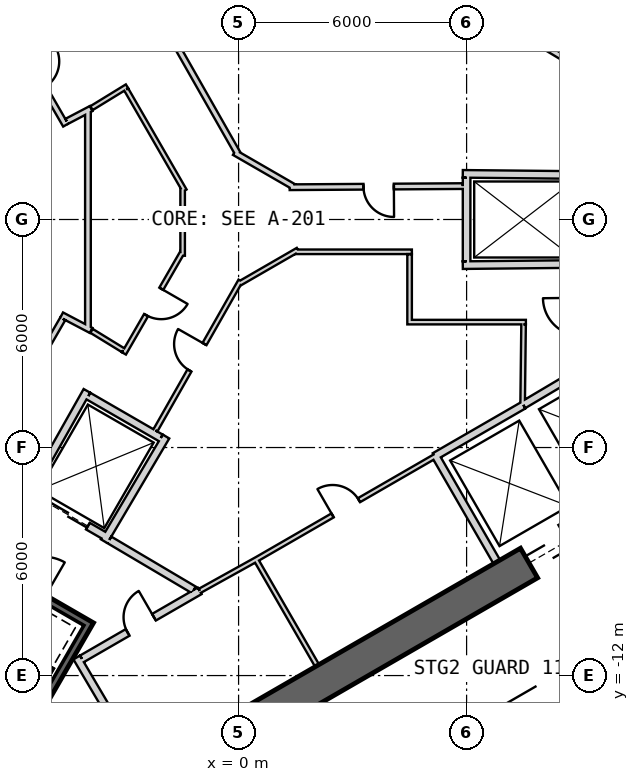
"""IFC4 building model, lengths in metres.
Left out: names, types, materials, properties, quantities, classifications, styles, units other than length and angle.
Written with IfcOpenShell. Run it as: python <this file> out.ifc"""

import sys

from ifc_helpers import new_model, si_unit, direction, frame, frame_2d, origin, place, context, subcontext, project, spatial, rectangle, extrude, element, fill, save


model = new_model("IFC4")
c1 = context("Model", 3, precision=1e-05, world=origin(), true_north=direction((0.0, 1.0)))
c2 = subcontext(c1, "Body", "Model", "MODEL_VIEW")
j1 = project(units=[si_unit("LENGTHUNIT", "METRE"), si_unit("PLANEANGLEUNIT", "RADIAN")], contexts=[c1])
p1 = place(None, origin())
s1 = spatial("IfcSite", under=j1, at=p1, CompositionType="ELEMENT")
p2 = place(p1, origin())
s2 = spatial("IfcBuilding", under=s1, at=p2, CompositionType="ELEMENT")
p3 = place(p2, frame((0.0, 0.0, -11.0)))
s3 = spatial("IfcBuildingStorey", under=s2, at=p3, CompositionType="ELEMENT", Elevation=-11.0)
p4 = place(p3, frame((19.475, 2.208, -0.4), z_axis=(0.0, 0.0, 1.0), x_axis=(-0.866028369851, 0.499994862586, 0.0)))
e1 = element("IfcWall", 1, at=p4, inside=s3, PredefinedType="SHEAR", context=c2, shape_type="SweptSolid", body=[
    extrude(rectangle(XDim=31.523, YDim=0.9, at=frame_2d((15.762, 0.0))), origin(), (0.0, 0.0, 1.0), 5.9),
])
p5 = place(p4, frame((3.612, 0.0, 0.4)))
e2 = element("IfcOpeningElement", 2, at=p5, cuts=e1, PredefinedType="OPENING", context=c2, shape_type="SweptSolid", body=[
    extrude(rectangle(XDim=1.2, YDim=2.4, at=frame_2d((0.6, 1.2))), frame((0.0, 0.46, 0.0), z_axis=(0.0, -1.0, 0.0), x_axis=(1.0, 0.0, 0.0)), (0.0, 0.0, 1.0), 0.92),
])
p6 = place(p4, frame((26.712, 0.0, 0.4)))
e3 = element("IfcOpeningElement", 3, at=p6, cuts=e1, PredefinedType="OPENING", context=c2, shape_type="SweptSolid", body=[
    extrude(rectangle(XDim=1.2, YDim=2.4, at=frame_2d((0.6, 1.2))), frame((0.0, 0.46, 0.0), z_axis=(0.0, -1.0, 0.0), x_axis=(1.0, 0.0, 0.0)), (0.0, 0.0, 1.0), 0.92),
])
p7 = place(p3, frame((-7.825, -17.97, -0.4), z_axis=(0.0, 0.0, 1.0), x_axis=(0.866028369851, 0.499994862586, 0.0)))
e4 = element("IfcWall", 4, at=p7, inside=s3, PredefinedType="SHEAR", context=c2, shape_type="SweptSolid", body=[
    extrude(rectangle(XDim=31.523, YDim=0.9, at=frame_2d((15.762, 0.0))), origin(), (0.0, 0.0, 1.0), 5.9),
])
p8 = place(p7, frame((17.862, 0.0, 0.4)))
e5 = element("IfcOpeningElement", 5, at=p8, cuts=e4, PredefinedType="OPENING", context=c2, shape_type="SweptSolid", body=[
    extrude(rectangle(XDim=1.2, YDim=2.4, at=frame_2d((0.6, 1.2))), frame((0.0, 0.46, 0.0), z_axis=(0.0, -1.0, 0.0), x_axis=(1.0, 0.0, 0.0)), (0.0, 0.0, 1.0), 0.92),
])
p9 = place(p7, frame((20.562, 0.0, 0.4)))
e6 = element("IfcOpeningElement", 6, at=p9, cuts=e4, PredefinedType="OPENING", context=c2, shape_type="SweptSolid", body=[
    extrude(rectangle(XDim=1.2, YDim=2.4, at=frame_2d((0.6, 1.2))), frame((0.0, 0.46, 0.0), z_axis=(0.0, -1.0, 0.0), x_axis=(1.0, 0.0, 0.0)), (0.0, 0.0, 1.0), 0.92),
])
p10 = place(p7, frame((26.712, 0.0, 0.4)))
e7 = element("IfcOpeningElement", 7, at=p10, cuts=e4, PredefinedType="OPENING", context=c2, shape_type="SweptSolid", body=[
    extrude(rectangle(XDim=1.2, YDim=2.4, at=frame_2d((0.6, 1.2))), frame((0.0, 0.46, 0.0), z_axis=(0.0, -1.0, 0.0), x_axis=(1.0, 0.0, 0.0)), (0.0, 0.0, 1.0), 0.92),
])
p11 = place(p7, frame((3.612, 0.0, 0.4)))
e8 = element("IfcOpeningElement", 8, at=p11, cuts=e4, PredefinedType="OPENING", context=c2, shape_type="SweptSolid", body=[
    extrude(rectangle(XDim=1.2, YDim=2.4, at=frame_2d((0.6, 1.2))), frame((0.0, 0.46, 0.0), z_axis=(0.0, -1.0, 0.0), x_axis=(1.0, 0.0, 0.0)), (0.0, 0.0, 1.0), 0.92),
])
p12 = place(p3, frame((6.795, -9.01, 0.0), z_axis=(0.0, 0.0, 1.0), x_axis=(-0.499984717929, 0.866034226713, 0.0)))
e9 = element("IfcWall", 9, at=p12, inside=s3, PredefinedType="PLUMBINGWALL", context=c2, shape_type="SweptSolid", body=[
    extrude(rectangle(XDim=3.25, YDim=0.2, at=frame_2d((1.625, 0.0))), origin(), (0.0, 0.0, 1.0), 5.1),
])
p13 = place(p3, frame((5.159, -6.236, 0.0), z_axis=(0.0, 0.0, 1.0), x_axis=(0.866036505625, 0.499980770555, 0.0)))
e10 = element("IfcWall", 10, at=p13, inside=s3, PredefinedType="PLUMBINGWALL", context=c2, shape_type="SweptSolid", body=[
    extrude(rectangle(XDim=2.7, YDim=0.2, at=frame_2d((1.35, 0.0))), origin(), (0.0, 0.0, 1.0), 5.1),
])
p14 = place(p3, frame((7.493, -4.878, 0.0), z_axis=(0.0, 0.0, 1.0), x_axis=(0.859981807212, 0.510324691999, 0.0)))
e11 = element("IfcWall", 11, at=p14, inside=s3, PredefinedType="PLUMBINGWALL", context=c2, shape_type="SweptSolid", body=[
    extrude(rectangle(XDim=1.845, YDim=0.2, at=frame_2d((0.922, 0.0))), origin(), (0.0, 0.0, 1.0), 5.1),
])
p15 = place(p3, frame((6.0, -1.1, 0.0), z_axis=(0.0, 0.0, 1.0), x_axis=(0.0, 1.0, 0.0)))
e12 = element("IfcWall", 12, at=p15, inside=s3, PredefinedType="PLUMBINGWALL", context=c2, shape_type="SweptSolid", body=[
    extrude(rectangle(XDim=2.2, YDim=0.2, at=frame_2d((1.1, 0.0))), origin(), (0.0, 0.0, 1.0), 5.1),
])
for number, where, z_axis, x_axis in (
    (13, (5.9, 1.201, 0.0), (0.0, 0.0, 1.0), (1.0, -0.01, 0.0)),
    (14, (5.9, -1.201, 0.0), (0.0, 0.0, 1.0), (1.0, 0.01, 0.0)),
):
    element("IfcWall", number, at=place(p3, frame(where, z_axis=z_axis, x_axis=x_axis)), inside=s3, PredefinedType="PLUMBINGWALL", context=c2, shape_type="SweptSolid", body=[
        extrude(rectangle(XDim=3.2, YDim=0.2, at=frame_2d((1.6, 0.0))), origin(), (0.0, 0.0, 1.0), 5.1),
    ])
p16 = place(p3, frame((-3.905, -10.563, -0.4), z_axis=(0.0, 0.0, 1.0), x_axis=(-0.500012932018, -0.866017937352, 0.0)))
e15 = element("IfcWall", 15, at=p16, inside=s3, PredefinedType="SHEAR", context=c2, shape_type="SweptSolid", body=[
    extrude(rectangle(XDim=8.1, YDim=0.2, at=frame_2d((4.05, 0.0))), origin(), (0.0, 0.0, 1.0), 5.5),
])
p17 = place(p3, frame((-4.041, -10.599, -0.4), z_axis=(0.0, 0.0, 1.0), x_axis=(-0.866047807691, 0.499961193289, 0.0)))
e16 = element("IfcWall", 16, at=p17, inside=s3, PredefinedType="SHEAR", context=c2, shape_type="SweptSolid", body=[
    extrude(rectangle(XDim=3.6, YDim=0.2, at=frame_2d((1.8, 0.0))), origin(), (0.0, 0.0, 1.0), 5.5),
])
p18 = place(p17, frame((1.25, 0.0, 0.4)))
e17 = element("IfcOpeningElement", 17, at=p18, cuts=e16, PredefinedType="OPENING", context=c2, shape_type="SweptSolid", body=[
    extrude(rectangle(XDim=1.1, YDim=2.1, at=frame_2d((0.55, 1.05))), frame((0.0, 0.11, 0.0), z_axis=(0.0, -1.0, 0.0), x_axis=(1.0, 0.0, 0.0)), (0.0, 0.0, 1.0), 0.22),
])
p19 = place(p3, frame((-3.446, -8.368, 0.0), z_axis=(0.0, 0.0, 1.0), x_axis=(-0.866024647952, 0.500001309137, 0.0)))
e18 = element("IfcWall", 18, at=p19, inside=s3, PredefinedType="PLUMBINGWALL", context=c2, shape_type="SweptSolid", body=[
    extrude(rectangle(XDim=2.4, YDim=0.2, at=frame_2d((1.2, 0.0))), origin(), (0.0, 0.0, 1.0), 5.1),
])
p20 = place(p19, frame((0.6, 0.0, 0.0)))
e19 = element("IfcOpeningElement", 19, at=p20, cuts=e18, PredefinedType="OPENING", context=c2, shape_type="SweptSolid", body=[
    extrude(rectangle(XDim=1.2, YDim=2.4, at=frame_2d((0.6, 1.2))), frame((0.0, 0.11, 0.0), z_axis=(0.0, -1.0, 0.0), x_axis=(1.0, 0.0, 0.0)), (0.0, 0.0, 1.0), 0.22),
])
p21 = place(p3, frame((-3.953, -4.646, 0.0), z_axis=(0.0, 0.0, 1.0), x_axis=(0.86605622881, -0.499946605688, 0.0)))
e20 = element("IfcWall", 20, at=p21, inside=s3, PredefinedType="PLUMBINGWALL", context=c2, shape_type="SweptSolid", body=[
    extrude(rectangle(XDim=2.2, YDim=0.2, at=frame_2d((1.1, 0.0))), origin(), (0.0, 0.0, 1.0), 5.1),
])
p22 = place(p3, frame((-1.91, -5.71, 0.0), z_axis=(0.0, 0.0, 1.0), x_axis=(-0.508616218331, -0.860993346345, 0.0)))
e21 = element("IfcWall", 21, at=p22, inside=s3, PredefinedType="PLUMBINGWALL", context=c2, shape_type="SweptSolid", body=[
    extrude(rectangle(XDim=3.2, YDim=0.2, at=frame_2d((1.6, 0.0))), origin(), (0.0, 0.0, 1.0), 5.1),
])
p23 = place(p3, frame((-3.99, -4.509, 0.0), z_axis=(0.0, 0.0, 1.0), x_axis=(-0.491358283181, -0.870957540612, 0.0)))
e22 = element("IfcWall", 22, at=p23, inside=s3, PredefinedType="PLUMBINGWALL", context=c2, shape_type="SweptSolid", body=[
    extrude(rectangle(XDim=3.2, YDim=0.2, at=frame_2d((1.6, 0.0))), origin(), (0.0, 0.0, 1.0), 5.1),
])
p24 = place(p3, frame((8.975, 4.0, 0.0), z_axis=(0.0, 0.0, 1.0), x_axis=(-0.857530436795, 0.514433231791, 0.0)))
e23 = element("IfcWall", 23, at=p24, inside=s3, PredefinedType="PLUMBINGWALL", context=c2, shape_type="SweptSolid", body=[
    extrude(rectangle(XDim=1.723, YDim=0.15, at=frame_2d((0.861, 0.0))), origin(), (0.0, 0.0, 1.0), 5.1),
])
p25 = place(p3, frame((2.067, -11.74, 0.0), z_axis=(0.0, 0.0, 1.0), x_axis=(-0.499984717929, 0.866034226713, 0.0)))
e24 = element("IfcWall", 24, at=p25, inside=s3, PredefinedType="PARTITIONING", context=c2, shape_type="SweptSolid", body=[
    extrude(rectangle(XDim=3.25, YDim=0.12, at=frame_2d((1.625, 0.0))), origin(), (0.0, 0.0, 1.0), 5.1),
])
p26 = place(p3, frame((-4.26, -11.524, 0.0), z_axis=(0.0, 0.0, 1.0), x_axis=(0.507997497166, -0.861358544901, 0.0)))
e25 = element("IfcWall", 25, at=p26, inside=s3, PredefinedType="PARTITIONING", context=c2, shape_type="SweptSolid", body=[
    extrude(rectangle(XDim=3.35, YDim=0.2, at=frame_2d((1.675, 0.0))), origin(), (0.0, 0.0, 1.0), 5.1),
])
p27 = place(p3, frame((-1.024, -9.771, 0.0), z_axis=(0.0, 0.0, 1.0), x_axis=(-0.866029903013, -0.499992207027, 0.0)))
e26 = element("IfcWall", 26, at=p27, inside=s3, PredefinedType="PARTITIONING", context=c2, shape_type="SweptSolid", body=[
    extrude(rectangle(XDim=3.578, YDim=0.2, at=frame_2d((1.789, 0.0))), origin(), (0.0, 0.0, 1.0), 5.1),
])
p28 = place(p27, frame((1.389, 0.0, 0.0)))
e27 = element("IfcOpeningElement", 27, at=p28, cuts=e26, PredefinedType="OPENING", context=c2, shape_type="SweptSolid", body=[
    extrude(rectangle(XDim=0.8, YDim=2.1, at=frame_2d((0.4, 1.05))), frame((0.0, 0.11, 0.0), z_axis=(0.0, -1.0, 0.0), x_axis=(1.0, 0.0, 0.0)), (0.0, 0.0, 1.0), 0.22),
])
p29 = place(p3, frame((-1.023, -9.772, 0.0), z_axis=(0.0, 0.0, 1.0), x_axis=(0.874290944206, 0.485402250592, 0.0)))
e28 = element("IfcWall", 28, at=p29, inside=s3, PredefinedType="PARTITIONING", context=c2, shape_type="SweptSolid", body=[
    extrude(rectangle(XDim=1.723, YDim=0.12, at=frame_2d((0.861, 0.0))), origin(), (0.0, 0.0, 1.0), 5.1),
])
p30 = place(p3, frame((0.483, -8.936, 0.0), z_axis=(0.0, 0.0, 1.0), x_axis=(0.866028230842, 0.499995103361, 0.0)))
e29 = element("IfcWall", 29, at=p30, inside=s3, PredefinedType="PARTITIONING", context=c2, shape_type="SweptSolid", body=[
    extrude(rectangle(XDim=5.4, YDim=0.12, at=frame_2d((2.7, 0.0))), origin(), (0.0, 0.0, 1.0), 5.1),
])
p31 = place(p30, frame((2.3, 0.0, 0.0)))
e30 = element("IfcOpeningElement", 30, at=p31, cuts=e29, PredefinedType="OPENING", context=c2, shape_type="SweptSolid", body=[
    extrude(rectangle(XDim=0.8, YDim=2.1, at=frame_2d((0.4, 1.05))), frame((0.0, 0.07, 0.0), z_axis=(0.0, -1.0, 0.0), x_axis=(1.0, 0.0, 0.0)), (0.0, 0.0, 1.0), 0.14),
])
p32 = place(p3, frame((-3.401, -8.43, 0.0), z_axis=(0.0, 0.0, 1.0), x_axis=(0.860630814782, -0.509229418482, 0.0)))
e31 = element("IfcWall", 31, at=p32, inside=s3, PredefinedType="PARTITIONING", context=c2, shape_type="SweptSolid", body=[
    extrude(rectangle(XDim=2.582, YDim=0.2, at=frame_2d((1.291, 0.0))), origin(), (0.0, 0.0, 1.0), 5.1),
])
p33 = place(p3, frame((1.344, 0.849, 0.0), z_axis=(0.0, 0.0, 1.0), x_axis=(0.999978627641, 0.00653790957, 0.0)))
e32 = element("IfcWall", 32, at=p33, inside=s3, PredefinedType="PLUMBINGWALL", context=c2, shape_type="SweptSolid", body=[
    extrude(rectangle(XDim=4.556, YDim=0.15, at=frame_2d((2.278, 0.0))), origin(), (0.0, 0.0, 1.0), 5.1),
])
p34 = place(p33, frame((1.942, 0.0, 0.0)))
e33 = element("IfcOpeningElement", 33, at=p34, cuts=e32, PredefinedType="OPENING", context=c2, shape_type="SweptSolid", body=[
    extrude(rectangle(XDim=0.8, YDim=2.1, at=frame_2d((0.4, 1.05))), frame((0.0, 0.085, 0.0), z_axis=(0.0, -1.0, 0.0), x_axis=(1.0, 0.0, 0.0)), (0.0, 0.0, 1.0), 0.17),
])
p35 = place(p3, frame((-0.111, 1.764, 0.0), z_axis=(0.0, 0.0, 1.0), x_axis=(0.866061671171, -0.499937177781, 0.0)))
e34 = element("IfcWall", 34, at=p35, inside=s3, PredefinedType="PLUMBINGWALL", context=c2, shape_type="SweptSolid", body=[
    extrude(rectangle(XDim=1.804, YDim=0.15, at=frame_2d((0.902, 0.0))), origin(), (0.0, 0.0, 1.0), 5.1),
])
p36 = place(p3, frame((-2.189, 5.549, 0.0), z_axis=(0.0, 0.0, 1.0), x_axis=(0.494335077001, -0.869271437266, 0.0)))
e35 = element("IfcWall", 35, at=p36, inside=s3, PredefinedType="PLUMBINGWALL", context=c2, shape_type="SweptSolid", body=[
    extrude(rectangle(XDim=4.404, YDim=0.15, at=frame_2d((2.202, 0.0))), origin(), (0.0, 0.0, 1.0), 5.1),
])
p37 = place(p3, frame((0.051, -1.611, 0.0), z_axis=(0.0, 0.0, 1.0), x_axis=(-0.49434454467, -0.869266053148, 0.0)))
e36 = element("IfcWall", 36, at=p37, inside=s3, PredefinedType="PARTITIONING", context=c2, shape_type="SweptSolid", body=[
    extrude(rectangle(XDim=4.53, YDim=0.12, at=frame_2d((2.265, 0.0))), origin(), (0.0, 0.0, 1.0), 5.1),
])
p38 = place(p37, frame((1.916, 0.0, 0.0)))
e37 = element("IfcOpeningElement", 37, at=p38, cuts=e36, PredefinedType="OPENING", context=c2, shape_type="SweptSolid", body=[
    extrude(rectangle(XDim=0.8, YDim=2.1, at=frame_2d((0.4, 1.05))), frame((0.0, 0.07, 0.0), z_axis=(0.0, -1.0, 0.0), x_axis=(1.0, 0.0, 0.0)), (0.0, 0.0, 1.0), 0.14),
])
p39 = place(p3, frame((1.562, -0.798, 0.0), z_axis=(0.0, 0.0, 1.0), x_axis=(-0.86601248742, -0.500022371132, 0.0)))
e38 = element("IfcWall", 38, at=p39, inside=s3, PredefinedType="PARTITIONING", context=c2, shape_type="SweptSolid", body=[
    extrude(rectangle(XDim=1.785, YDim=0.12, at=frame_2d((0.893, 0.0))), origin(), (0.0, 0.0, 1.0), 5.1),
])
p40 = place(p3, frame((4.56, -0.85, 0.0), z_axis=(0.0, 0.0, 1.0), x_axis=(-1.0, 0.0, 0.0)))
e39 = element("IfcWall", 39, at=p40, inside=s3, PredefinedType="PARTITIONING", context=c2, shape_type="SweptSolid", body=[
    extrude(rectangle(XDim=3.069, YDim=0.12, at=frame_2d((1.535, 0.0))), origin(), (0.0, 0.0, 1.0), 5.1),
])
p41 = place(p3, frame((4.5, -2.76, 0.0), z_axis=(0.0, 0.0, 1.0), x_axis=(0.0, 1.0, 0.0)))
e40 = element("IfcWall", 40, at=p41, inside=s3, PredefinedType="PARTITIONING", context=c2, shape_type="SweptSolid", body=[
    extrude(rectangle(XDim=1.85, YDim=0.12, at=frame_2d((0.925, 0.0))), origin(), (0.0, 0.0, 1.0), 5.1),
])
p42 = place(p3, frame((7.56, -2.7, 0.0), z_axis=(0.0, 0.0, 1.0), x_axis=(-1.0, 0.0, 0.0)))
e41 = element("IfcWall", 41, at=p42, inside=s3, PredefinedType="PARTITIONING", context=c2, shape_type="SweptSolid", body=[
    extrude(rectangle(XDim=3.0, YDim=0.12, at=frame_2d((1.5, 0.0))), origin(), (0.0, 0.0, 1.0), 5.1),
])
p43 = place(p3, frame((7.475, -4.865, 0.0), z_axis=(0.0, 0.0, 1.0), x_axis=(0.011716133148, 0.999931363757, 0.0)))
e42 = element("IfcWall", 42, at=p43, inside=s3, PredefinedType="PARTITIONING", context=c2, shape_type="SweptSolid", body=[
    extrude(rectangle(XDim=2.105, YDim=0.12, at=frame_2d((1.052, 0.0))), origin(), (0.0, 0.0, 1.0), 5.1),
])
p44 = place(p3, frame((-3.964, -2.908, 0.0), z_axis=(0.0, 0.0, 1.0), x_axis=(0.0, 1.0, 0.0)))
e43 = element("IfcWall", 43, at=p44, inside=s3, PredefinedType="PLUMBINGWALL", context=c2, shape_type="SweptSolid", body=[
    extrude(rectangle(XDim=5.815, YDim=0.15, at=frame_2d((2.908, 0.0))), origin(), (0.0, 0.0, 1.0), 5.1),
])
p45 = place(p3, frame((-4.655, -2.512, 0.0), z_axis=(0.0, 0.0, 1.0), x_axis=(0.885372046241, -0.464883146323, 0.0)))
e44 = element("IfcWall", 44, at=p45, inside=s3, PredefinedType="PLUMBINGWALL", context=c2, shape_type="SweptSolid", body=[
    extrude(rectangle(XDim=0.875, YDim=0.15, at=frame_2d((0.437, 0.0))), origin(), (0.0, 0.0, 1.0), 5.1),
])
p46 = place(p3, frame((-6.126, -5.21, 0.0), z_axis=(0.0, 0.0, 1.0), x_axis=(0.499990139034, 0.866031096941, 0.0)))
e45 = element("IfcWall", 45, at=p46, inside=s3, PredefinedType="PLUMBINGWALL", context=c2, shape_type="SweptSolid", body=[
    extrude(rectangle(XDim=3.0, YDim=0.15, at=frame_2d((1.5, 0.0))), origin(), (0.0, 0.0, 1.0), 5.1),
])
p47 = place(p3, frame((-4.551, 2.482, 0.0), z_axis=(0.0, 0.0, 1.0), x_axis=(-0.499990139034, 0.866031096941, 0.0)))
e46 = element("IfcWall", 46, at=p47, inside=s3, PredefinedType="PLUMBINGWALL", context=c2, shape_type="SweptSolid", body=[
    extrude(rectangle(XDim=3.0, YDim=0.15, at=frame_2d((1.5, 0.0))), origin(), (0.0, 0.0, 1.0), 5.1),
])
p48 = place(p47, frame((1.137, 0.0, 0.0)))
e47 = element("IfcOpeningElement", 47, at=p48, cuts=e46, PredefinedType="OPENING", context=c2, shape_type="SweptSolid", body=[
    extrude(rectangle(XDim=0.8, YDim=2.1, at=frame_2d((0.4, 1.05))), frame((0.0, 0.085, 0.0), z_axis=(0.0, -1.0, 0.0), x_axis=(1.0, 0.0, 0.0)), (0.0, 0.0, 1.0), 0.17),
])
p49 = place(p3, frame((-3.881, 2.919, 0.0), z_axis=(0.0, 0.0, 1.0), x_axis=(-0.885422176933, -0.464787659684, 0.0)))
e48 = element("IfcWall", 48, at=p49, inside=s3, PredefinedType="PLUMBINGWALL", context=c2, shape_type="SweptSolid", body=[
    extrude(rectangle(XDim=0.724, YDim=0.15, at=frame_2d((0.362, 0.0))), origin(), (0.0, 0.0, 1.0), 5.1),
])
p50 = place(p3, frame((-2.935, 3.503, 0.0), z_axis=(0.0, 0.0, 1.0), x_axis=(-0.852482838041, -0.522755211209, 0.0)))
e49 = element("IfcWall", 49, at=p50, inside=s3, PredefinedType="PARTITIONING", context=c2, shape_type="SweptSolid", body=[
    extrude(rectangle(XDim=1.097, YDim=0.12, at=frame_2d((0.548, 0.0))), origin(), (0.0, 0.0, 1.0), 5.1),
])
p51 = place(p3, frame((-1.42, 0.76, 0.0), z_axis=(0.0, 0.0, 1.0), x_axis=(-0.500011413361, 0.866018814177, 0.0)))
e50 = element("IfcWall", 50, at=p51, inside=s3, PredefinedType="PARTITIONING", context=c2, shape_type="SweptSolid", body=[
    extrude(rectangle(XDim=3.072, YDim=0.12, at=frame_2d((1.536, 0.0))), origin(), (0.0, 0.0, 1.0), 5.1),
])
p52 = place(p3, frame((-1.472, -0.954, 0.0), z_axis=(0.0, 0.0, 1.0), x_axis=(0.0, 1.0, 0.0)))
e51 = element("IfcWall", 51, at=p52, inside=s3, PredefinedType="PARTITIONING", context=c2, shape_type="SweptSolid", body=[
    extrude(rectangle(XDim=1.785, YDim=0.12, at=frame_2d((0.893, 0.0))), origin(), (0.0, 0.0, 1.0), 5.1),
])
p53 = place(p3, frame((-3.016, -3.524, 0.0), z_axis=(0.0, 0.0, 1.0), x_axis=(0.499988681553, 0.866031938394, 0.0)))
e52 = element("IfcWall", 52, at=p53, inside=s3, PredefinedType="PARTITIONING", context=c2, shape_type="SweptSolid", body=[
    extrude(rectangle(XDim=3.069, YDim=0.12, at=frame_2d((1.535, 0.0))), origin(), (0.0, 0.0, 1.0), 5.1),
])
p54 = place(p53, frame((1.165, 0.0, 0.0)))
e53 = element("IfcOpeningElement", 53, at=p54, cuts=e52, PredefinedType="OPENING", context=c2, shape_type="SweptSolid", body=[
    extrude(rectangle(XDim=0.8, YDim=2.1, at=frame_2d((0.4, 1.05))), frame((0.0, 0.07, 0.0), z_axis=(0.0, -1.0, 0.0), x_axis=(1.0, 0.0, 0.0)), (0.0, 0.0, 1.0), 0.14),
])
p55 = place(p3, frame((-3.87, -2.93, 0.0), z_axis=(0.0, 0.0, 1.0), x_axis=(0.852489850103, -0.522743776119, 0.0)))
e54 = element("IfcWall", 54, at=p55, inside=s3, PredefinedType="PARTITIONING", context=c2, shape_type="SweptSolid", body=[
    extrude(rectangle(XDim=0.977, YDim=0.12, at=frame_2d((0.488, 0.0))), origin(), (0.0, 0.0, 1.0), 5.1),
])
p56 = place(p3, frame((30.376, 1.169, 0.0), z_axis=(0.0, 0.0, 1.0), x_axis=(-0.865777000343, 0.500430000777, 0.0)))
e55 = element("IfcWall", 55, at=p56, inside=s3, PredefinedType="PARTITIONING", context=c2, shape_type="SweptSolid", body=[
    extrude(rectangle(XDim=39.978, YDim=0.12, at=frame_2d((19.989, 0.0))), origin(), (0.0, 0.0, 1.0), 4.18),
])
p57 = place(p56, frame((28.784, 0.0, 0.0)))
e56 = element("IfcOpeningElement", 56, at=p57, cuts=e55, PredefinedType="OPENING", context=c2, shape_type="SweptSolid", body=[
    extrude(rectangle(XDim=1.2, YDim=2.4, at=frame_2d((0.6, 1.2))), frame((0.0, 0.07, 0.0), z_axis=(0.0, -1.0, 0.0), x_axis=(1.0, 0.0, 0.0)), (0.0, 0.0, 1.0), 0.14),
])
p58 = place(p56, frame((9.984, 0.0, 0.0)))
e57 = element("IfcOpeningElement", 57, at=p58, cuts=e55, PredefinedType="OPENING", context=c2, shape_type="SweptSolid", body=[
    extrude(rectangle(XDim=1.2, YDim=2.4, at=frame_2d((0.6, 1.2))), frame((0.0, 0.07, 0.0), z_axis=(0.0, -1.0, 0.0), x_axis=(1.0, 0.0, 0.0)), (0.0, 0.0, 1.0), 0.14),
])
p59 = place(p20, origin())
e58 = element("IfcDoor", 58, at=p59, inside=s3, OperationType="SLIDING_TO_LEFT", PredefinedType="USERDEFINED", context=c2, shape_type="SweptSolid", body=[
    extrude(rectangle(XDim=1.2, YDim=2.4, at=frame_2d((0.6, 1.2))), frame((0.0, 0.025, 0.0), z_axis=(0.0, -1.0, 0.0), x_axis=(1.0, 0.0, 0.0)), (0.0, 0.0, 1.0), 0.05),
])
fill(e19, e58)
p60 = place(p34, origin())
e59 = element("IfcDoor", 59, at=p60, inside=s3, OperationType="SINGLE_SWING_RIGHT", PredefinedType="USERDEFINED", context=c2, shape_type="SweptSolid", body=[
    extrude(rectangle(XDim=0.8, YDim=2.1, at=frame_2d((0.4, 1.05))), frame((0.0, 0.025, 0.0), z_axis=(0.0, -1.0, 0.0), x_axis=(1.0, 0.0, 0.0)), (0.0, 0.0, 1.0), 0.05),
])
fill(e33, e59)
p61 = place(p38, origin())
e60 = element("IfcDoor", 60, at=p61, inside=s3, OperationType="SINGLE_SWING_LEFT", PredefinedType="USERDEFINED", context=c2, shape_type="SweptSolid", body=[
    extrude(rectangle(XDim=0.8, YDim=2.1, at=frame_2d((0.4, 1.05))), frame((0.0, 0.025, 0.0), z_axis=(0.0, -1.0, 0.0), x_axis=(1.0, 0.0, 0.0)), (0.0, 0.0, 1.0), 0.05),
])
fill(e37, e60)
p62 = place(p54, origin())
e61 = element("IfcDoor", 61, at=p62, inside=s3, OperationType="SINGLE_SWING_RIGHT", PredefinedType="USERDEFINED", context=c2, shape_type="SweptSolid", body=[
    extrude(rectangle(XDim=0.8, YDim=2.1, at=frame_2d((0.4, 1.05))), frame((0.0, 0.025, 0.0), z_axis=(0.0, -1.0, 0.0), x_axis=(1.0, 0.0, 0.0)), (0.0, 0.0, 1.0), 0.05),
])
fill(e53, e61)
p63 = place(p28, origin())
e62 = element("IfcDoor", 62, at=p63, inside=s3, OperationType="SINGLE_SWING_LEFT", PredefinedType="USERDEFINED", context=c2, shape_type="SweptSolid", body=[
    extrude(rectangle(XDim=0.8, YDim=2.1, at=frame_2d((0.4, 1.05))), frame((0.0, 0.025, 0.0), z_axis=(0.0, -1.0, 0.0), x_axis=(1.0, 0.0, 0.0)), (0.0, 0.0, 1.0), 0.05),
])
fill(e27, e62)
p64 = place(p31, origin())
e63 = element("IfcDoor", 63, at=p64, inside=s3, OperationType="SINGLE_SWING_LEFT", PredefinedType="USERDEFINED", context=c2, shape_type="SweptSolid", body=[
    extrude(rectangle(XDim=0.8, YDim=2.1, at=frame_2d((0.4, 1.05))), frame((0.0, 0.025, 0.0), z_axis=(0.0, -1.0, 0.0), x_axis=(1.0, 0.0, 0.0)), (0.0, 0.0, 1.0), 0.05),
])
fill(e30, e63)
p65 = place(p8, origin())
e64 = element("IfcDoor", 64, at=p65, inside=s3, OperationType="SLIDING_TO_LEFT", PredefinedType="USERDEFINED", context=c2, shape_type="SweptSolid", body=[
    extrude(rectangle(XDim=1.2, YDim=2.4, at=frame_2d((0.6, 1.2))), frame((0.0, 0.025, 0.0), z_axis=(0.0, -1.0, 0.0), x_axis=(1.0, 0.0, 0.0)), (0.0, 0.0, 1.0), 0.05),
])
fill(e5, e64)
save(model, sys.argv[1])
